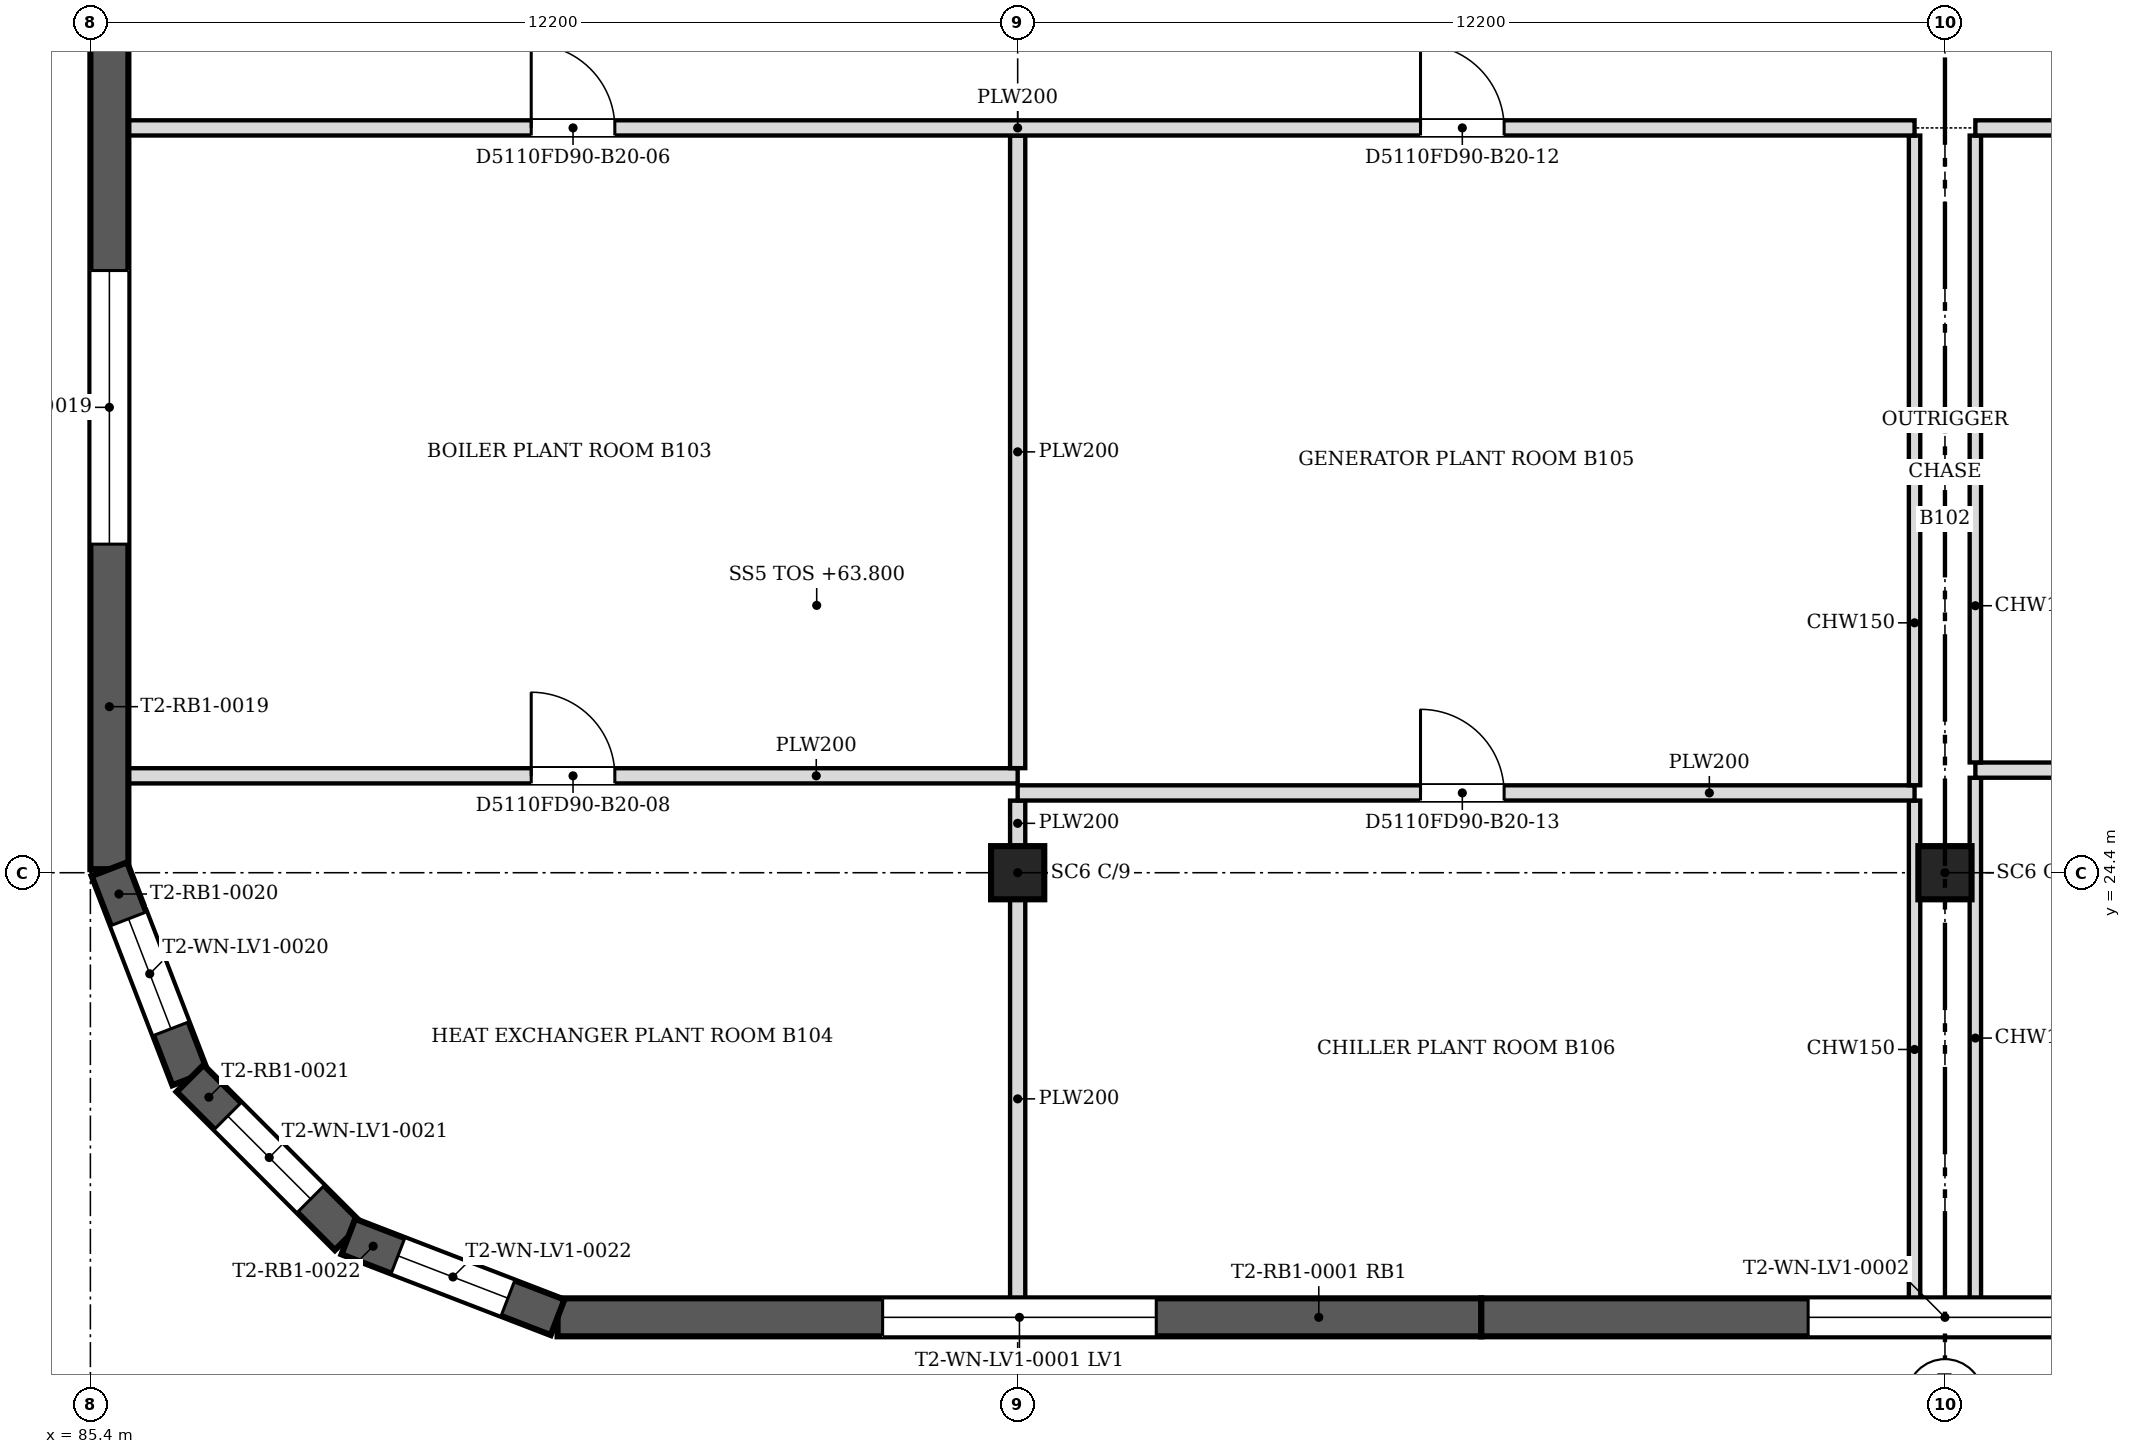
"""IFC4 building model, lengths in metres.
Left out: names, types, materials, properties, quantities, classifications, styles, units other than length and angle.
Written with IfcOpenShell. Run it as: python <this file> out.ifc"""

import sys

from ifc_helpers import new_model, si_unit, direction, frame, frame_2d, origin, origin_2d, place, context, subcontext, project, spatial, polyline, rectangle, outline, extrude, faceted_brep, source, transform, mapped, element, fill, save


model = new_model("IFC4")
c1 = context("Model", 3, precision=1e-05, world=origin(), true_north=direction((0.0, 1.0)))
c2 = subcontext(c1, "Body", "Model", "MODEL_VIEW")
j1 = project(units=[si_unit("LENGTHUNIT", "METRE"), si_unit("PLANEANGLEUNIT", "RADIAN")], contexts=[c1])
p1 = place(None, origin())
s1 = spatial("IfcSite", under=j1, at=p1, CompositionType="ELEMENT")
p2 = place(p1, origin())
s2 = spatial("IfcBuilding", under=s1, at=p2, CompositionType="ELEMENT")
p3 = place(p2, frame((0.0, 0.0, 63.8)))
s3 = spatial("IfcBuildingStorey", under=s2, at=p3, CompositionType="ELEMENT", Elevation=63.8)
for number, where, z_axis, x_axis in (
    (1, (97.6, 24.4, 0.0), (0.0, 0.0, 1.0), (1.0, 0.0, 0.0)),
    (2, (109.8, 24.4, 0.0), (0.0, 0.0, 1.0), (1.0, 0.0, 0.0)),
):
    element("IfcColumn", number, at=place(p3, frame(where, z_axis=z_axis, x_axis=x_axis)), inside=s3, PredefinedType="COLUMN", context=c2, shape_type="SweptSolid", body=[
        extrude(rectangle(XDim=0.7, YDim=0.7, at=origin_2d()), origin(), (0.0, 0.0, 1.0), 4.6),
    ])
m1 = source(origin(), c2, "Body", "Brep", [
    faceted_brep([(0.0, -0.25, 0.0), (12.154, -0.25, 0.0), (12.154, -0.25, 4.8), (0.0, -0.25, 4.8), (0.047, 0.25, 4.8), (12.154, 0.25, 4.8), (12.154, 0.25, 0.0), (0.047, 0.25, 0.0), (0.0, 0.0, 0.0), (0.0, 0.0, 4.8)], [[[0, 1, 2, 3]], [[4, 5, 6, 7]], [[7, 6, 1, 0, 8]], [[5, 4, 9, 3, 2]], [[8, 0, 3, 9]], [[7, 8, 9, 4]], [[1, 6, 5, 2]]]),
])
p4 = place(p3, frame((91.547, 18.55, 0.0), z_axis=(0.0, 0.0, 1.0), x_axis=(1.0, 0.0, 0.0)))
e3 = element("IfcWall", 3, at=p4, inside=s3, PredefinedType="SOLIDWALL", context=c2, shape_type="MappedRepresentation", body=[
    mapped(m1, transform((0.0, 0.0, 0.0), scale=1.0)),
])
m2 = source(origin(), c2, "Body", "SweptSolid", [
    extrude(outline(polyline([(4.277, 0.8), (7.877, 0.8), (7.877, 4.0), (4.277, 4.0), (4.277, 0.8)])), frame((0.0, 0.26, 0.0), z_axis=(0.0, -1.0, 0.0), x_axis=(1.0, 0.0, 0.0)), (0.0, 0.0, 1.0), 0.52),
])
p5 = place(p4, origin())
e4 = element("IfcOpeningElement", 4, at=p5, cuts=e3, PredefinedType="OPENING", context=c2, shape_type="MappedRepresentation", body=[
    mapped(m2, transform((0.0, 0.0, 0.0), scale=1.0)),
])
m3 = source(origin(), c2, "Body", "SweptSolid", [
    extrude(outline(polyline([(0.0, 0.0), (12.2, 0.0), (12.2, 4.8), (0.0, 4.8), (0.0, 0.0)])), frame((0.0, 0.25, 0.0), z_axis=(0.0, -1.0, 0.0), x_axis=(1.0, 0.0, 0.0)), (0.0, 0.0, 1.0), 0.5),
])
p6 = place(p3, frame((103.7, 18.55, 0.0), z_axis=(0.0, 0.0, 1.0), x_axis=(1.0, 0.0, 0.0)))
e5 = element("IfcWall", 5, at=p6, inside=s3, PredefinedType="SOLIDWALL", context=c2, shape_type="MappedRepresentation", body=[
    mapped(m3, transform((0.0, 0.0, 0.0), scale=1.0)),
])
m4 = source(origin(), c2, "Body", "SweptSolid", [
    extrude(outline(polyline([(4.3, 0.8), (7.9, 0.8), (7.9, 4.0), (4.3, 4.0), (4.3, 0.8)])), frame((0.0, 0.26, 0.0), z_axis=(0.0, -1.0, 0.0), x_axis=(1.0, 0.0, 0.0)), (0.0, 0.0, 1.0), 0.52),
])
p7 = place(p6, origin())
e6 = element("IfcOpeningElement", 6, at=p7, cuts=e5, PredefinedType="OPENING", context=c2, shape_type="MappedRepresentation", body=[
    mapped(m4, transform((0.0, 0.0, 0.0), scale=1.0)),
])
m5 = source(origin(), c2, "Body", "Brep", [
    faceted_brep([(0.0, -0.25, 0.0), (12.154, -0.25, 0.0), (12.154, -0.25, 4.8), (0.0, -0.25, 4.8), (0.0, 0.25, 4.8), (12.107, 0.25, 4.8), (12.107, 0.25, 0.0), (0.0, 0.25, 0.0), (12.154, -0.0, 0.0), (12.154, -0.0, 4.8)], [[[0, 1, 2, 3]], [[4, 5, 6, 7]], [[7, 6, 8, 1, 0]], [[9, 2, 1, 8]], [[5, 4, 3, 2, 9]], [[4, 7, 0, 3]], [[8, 6, 5, 9]]]),
])
p8 = place(p3, frame((85.65, 36.6, 0.0), z_axis=(0.0, 0.0, 1.0), x_axis=(0.0, -1.0, 0.0)))
e7 = element("IfcWall", 7, at=p8, inside=s3, PredefinedType="SOLIDWALL", context=c2, shape_type="MappedRepresentation", body=[
    mapped(m5, transform((0.0, 0.0, 0.0), scale=1.0)),
])
p9 = place(p8, origin())
e8 = element("IfcOpeningElement", 8, at=p9, cuts=e7, PredefinedType="OPENING", context=c2, shape_type="MappedRepresentation", body=[
    mapped(m2, transform((0.0, 0.0, 0.0), scale=1.0)),
])
m6 = source(origin(), c2, "Body", "Brep", [
    faceted_brep([(0.0, -0.25, 0.0), (2.95, -0.25, 0.0), (2.95, -0.25, 4.8), (0.0, -0.25, 4.8), (0.047, 0.25, 4.8), (2.898, 0.25, 4.8), (2.898, 0.25, 0.0), (0.047, 0.25, 0.0), (2.95, 0.0, 0.0), (0.0, 0.0, 0.0), (2.95, 0.0, 4.8), (0.0, 0.0, 4.8)], [[[0, 1, 2, 3]], [[4, 5, 6, 7]], [[7, 6, 8, 1, 0, 9]], [[10, 2, 1, 8]], [[5, 4, 11, 3, 2, 10]], [[9, 0, 3, 11]], [[7, 9, 11, 4]], [[8, 6, 5, 10]]]),
])
p10 = place(p3, frame((85.65, 24.447, 0.0), z_axis=(0.0, 0.0, 1.0), x_axis=(0.359949242603, -0.932971887438, 0.0)))
e9 = element("IfcWall", 9, at=p10, inside=s3, PredefinedType="SOLIDWALL", context=c2, shape_type="MappedRepresentation", body=[
    mapped(m6, transform((0.0, 0.0, 0.0), scale=1.0)),
])
m7 = source(origin(), c2, "Body", "SweptSolid", [
    extrude(outline(polyline([(0.7, 0.8), (2.25, 0.8), (2.25, 4.0), (0.7, 4.0), (0.7, 0.8)])), frame((0.0, 0.26, 0.0), z_axis=(0.0, -1.0, 0.0), x_axis=(1.0, 0.0, 0.0)), (0.0, 0.0, 1.0), 0.52),
])
p11 = place(p10, origin())
e10 = element("IfcOpeningElement", 10, at=p11, cuts=e9, PredefinedType="OPENING", context=c2, shape_type="MappedRepresentation", body=[
    mapped(m7, transform((0.0, 0.0, 0.0), scale=1.0)),
])
m8 = source(origin(), c2, "Body", "Brep", [
    faceted_brep([(0.0, -0.25, 0.0), (2.944, -0.25, 0.0), (2.944, -0.25, 4.8), (0.0, -0.25, 4.8), (0.053, 0.25, 4.8), (2.891, 0.25, 4.8), (2.891, 0.25, 0.0), (0.053, 0.25, 0.0), (2.944, 0.0, 0.0), (0.0, 0.0, 0.0), (2.944, 0.0, 4.8), (0.0, 0.0, 4.8)], [[[0, 1, 2, 3]], [[4, 5, 6, 7]], [[7, 6, 8, 1, 0, 9]], [[10, 2, 1, 8]], [[5, 4, 11, 3, 2, 10]], [[9, 0, 3, 11]], [[7, 9, 11, 4]], [[8, 6, 5, 10]]]),
])
p12 = place(p3, frame((86.712, 21.694, 0.0), z_axis=(0.0, 0.0, 1.0), x_axis=(0.707106781187, -0.707106781187, 0.0)))
e11 = element("IfcWall", 11, at=p12, inside=s3, PredefinedType="SOLIDWALL", context=c2, shape_type="MappedRepresentation", body=[
    mapped(m8, transform((0.0, 0.0, 0.0), scale=1.0)),
])
m9 = source(origin(), c2, "Body", "SweptSolid", [
    extrude(outline(polyline([(0.7, 0.8), (2.244, 0.8), (2.244, 4.0), (0.7, 4.0), (0.7, 0.8)])), frame((0.0, 0.26, 0.0), z_axis=(0.0, -1.0, 0.0), x_axis=(1.0, 0.0, 0.0)), (0.0, 0.0, 1.0), 0.52),
])
p13 = place(p12, origin())
e12 = element("IfcOpeningElement", 12, at=p13, cuts=e11, PredefinedType="OPENING", context=c2, shape_type="MappedRepresentation", body=[
    mapped(m9, transform((0.0, 0.0, 0.0), scale=1.0)),
])
m10 = source(origin(), c2, "Body", "Brep", [
    faceted_brep([(0.0, -0.25, 0.0), (2.95, -0.25, 0.0), (2.95, -0.25, 4.8), (0.0, -0.25, 4.8), (0.053, 0.25, 4.8), (2.904, 0.25, 4.8), (2.904, 0.25, 0.0), (0.053, 0.25, 0.0), (2.95, 0.0, 0.0), (0.0, 0.0, 0.0), (2.95, 0.0, 4.8), (0.0, 0.0, 4.8)], [[[0, 1, 2, 3]], [[4, 5, 6, 7]], [[7, 6, 8, 1, 0, 9]], [[10, 2, 1, 8]], [[5, 4, 11, 3, 2, 10]], [[9, 0, 3, 11]], [[7, 9, 11, 4]], [[8, 6, 5, 10]]]),
])
p14 = place(p3, frame((88.794, 19.612, 0.0), z_axis=(0.0, 0.0, 1.0), x_axis=(0.932999673775, -0.359877213415, 0.0)))
e13 = element("IfcWall", 13, at=p14, inside=s3, PredefinedType="SOLIDWALL", context=c2, shape_type="MappedRepresentation", body=[
    mapped(m10, transform((0.0, 0.0, 0.0), scale=1.0)),
])
p15 = place(p14, origin())
e14 = element("IfcOpeningElement", 14, at=p15, cuts=e13, PredefinedType="OPENING", context=c2, shape_type="MappedRepresentation", body=[
    mapped(m7, transform((0.0, 0.0, 0.0), scale=1.0)),
])
p16 = place(p3, frame((97.6, 18.8, 0.0), z_axis=(0.0, 0.0, 1.0), x_axis=(0.0, 1.0, 0.0)))
e15 = element("IfcWall", 15, at=p16, inside=s3, PredefinedType="PARTITIONING", context=c2, shape_type="SweptSolid", body=[
    extrude(rectangle(XDim=5.249, YDim=0.2, at=frame_2d((2.625, 0.0))), origin(), (0.0, 0.0, 1.0), 4.067),
])
p17 = place(p3, frame((109.4, 18.8, 0.0), z_axis=(0.0, 0.0, 1.0), x_axis=(0.0, 1.0, 0.0)))
e16 = element("IfcWall", 16, at=p17, inside=s3, PredefinedType="PARTITIONING", context=c2, shape_type="SweptSolid", body=[
    extrude(rectangle(XDim=6.549, YDim=0.15, at=frame_2d((3.274, 0.0))), origin(), (0.0, 0.0, 1.0), 4.067),
])
p18 = place(p3, frame((110.2, 18.8, 0.0), z_axis=(0.0, 0.0, 1.0), x_axis=(0.0, 1.0, 0.0)))
e17 = element("IfcWall", 17, at=p18, inside=s3, PredefinedType="PARTITIONING", context=c2, shape_type="SweptSolid", body=[
    extrude(rectangle(XDim=6.849, YDim=0.15, at=frame_2d((3.424, 0.0))), origin(), (0.0, 0.0, 1.0), 4.067),
])
p19 = place(p3, frame((97.6, 24.751, 0.0), z_axis=(0.0, 0.0, 1.0), x_axis=(0.0, 1.0, 0.0)))
e18 = element("IfcWall", 18, at=p19, inside=s3, PredefinedType="PARTITIONING", context=c2, shape_type="SweptSolid", body=[
    extrude(rectangle(XDim=0.598, YDim=0.2, at=frame_2d((0.299, 0.0))), origin(), (0.0, 0.0, 1.0), 4.067),
])
p20 = place(p3, frame((109.4, 25.45, 0.0), z_axis=(0.0, 0.0, 1.0), x_axis=(-1.0, 0.0, 0.0)))
e19 = element("IfcWall", 19, at=p20, inside=s3, PredefinedType="PARTITIONING", context=c2, shape_type="SweptSolid", body=[
    extrude(rectangle(XDim=11.8, YDim=0.2, at=frame_2d((5.9, 0.0))), origin(), (0.0, 0.0, 1.0), 4.067),
])
m11 = source(origin(), c2, "Body", "SweptSolid", [
    extrude(rectangle(XDim=1.1, YDim=2.1, at=frame_2d((0.55, 1.05))), frame((0.0, 0.11, 0.0), z_axis=(0.0, -1.0, 0.0), x_axis=(1.0, 0.0, 0.0)), (0.0, 0.0, 1.0), 0.22),
])
p21 = place(p20, frame((5.4, 0.0, 0.0)))
e20 = element("IfcOpeningElement", 20, at=p21, cuts=e19, PredefinedType="OPENING", context=c2, shape_type="MappedRepresentation", body=[
    mapped(m11, transform((0.0, 0.0, 0.0), scale=1.0)),
])
p22 = place(p3, frame((109.4, 25.551, 0.0), z_axis=(0.0, 0.0, 1.0), x_axis=(0.0, 1.0, 0.0)))
e21 = element("IfcWall", 21, at=p22, inside=s3, PredefinedType="PARTITIONING", context=c2, shape_type="SweptSolid", body=[
    extrude(rectangle(XDim=8.548, YDim=0.15, at=frame_2d((4.274, 0.0))), origin(), (0.0, 0.0, 1.0), 4.067),
])
p23 = place(p3, frame((97.6, 25.675, 0.0), z_axis=(0.0, 0.0, 1.0), x_axis=(-1.0, 0.0, 0.0)))
e22 = element("IfcWall", 22, at=p23, inside=s3, PredefinedType="PARTITIONING", context=c2, shape_type="SweptSolid", body=[
    extrude(rectangle(XDim=11.7, YDim=0.2, at=frame_2d((5.85, 0.0))), origin(), (0.0, 0.0, 1.0), 4.067),
])
p24 = place(p23, frame((5.3, 0.0, 0.0)))
e23 = element("IfcOpeningElement", 23, at=p24, cuts=e22, PredefinedType="OPENING", context=c2, shape_type="MappedRepresentation", body=[
    mapped(m11, transform((0.0, 0.0, 0.0), scale=1.0)),
])
p25 = place(p3, frame((122.0, 25.75, 0.0), z_axis=(0.0, 0.0, 1.0), x_axis=(-1.0, 0.0, 0.0)))
e24 = element("IfcWall", 24, at=p25, inside=s3, PredefinedType="PARTITIONING", context=c2, shape_type="SweptSolid", body=[
    extrude(rectangle(XDim=11.8, YDim=0.2, at=frame_2d((5.9, 0.0))), origin(), (0.0, 0.0, 1.0), 4.067),
])
p26 = place(p25, frame((5.4, 0.0, 0.0)))
e25 = element("IfcOpeningElement", 25, at=p26, cuts=e24, PredefinedType="OPENING", context=c2, shape_type="MappedRepresentation", body=[
    mapped(m11, transform((0.0, 0.0, 0.0), scale=1.0)),
])
p27 = place(p3, frame((97.6, 25.776, 0.0), z_axis=(0.0, 0.0, 1.0), x_axis=(0.0, 1.0, 0.0)))
e26 = element("IfcWall", 26, at=p27, inside=s3, PredefinedType="PARTITIONING", context=c2, shape_type="SweptSolid", body=[
    extrude(rectangle(XDim=8.323, YDim=0.2, at=frame_2d((4.162, 0.0))), origin(), (0.0, 0.0, 1.0), 4.067),
])
p28 = place(p3, frame((110.2, 25.851, 0.0), z_axis=(0.0, 0.0, 1.0), x_axis=(0.0, 1.0, 0.0)))
e27 = element("IfcWall", 27, at=p28, inside=s3, PredefinedType="PARTITIONING", context=c2, shape_type="SweptSolid", body=[
    extrude(rectangle(XDim=8.248, YDim=0.15, at=frame_2d((4.124, 0.0))), origin(), (0.0, 0.0, 1.0), 4.067),
])
p29 = place(p3, frame((109.4, 34.2, 0.0), z_axis=(0.0, 0.0, 1.0), x_axis=(-1.0, 0.0, 0.0)))
e28 = element("IfcWall", 28, at=p29, inside=s3, PredefinedType="PARTITIONING", context=c2, shape_type="SweptSolid", body=[
    extrude(rectangle(XDim=23.5, YDim=0.2, at=frame_2d((11.75, 0.0))), origin(), (0.0, 0.0, 1.0), 4.067),
])
p30 = place(p29, frame((17.1, 0.0, 0.0)))
e29 = element("IfcOpeningElement", 29, at=p30, cuts=e28, PredefinedType="OPENING", context=c2, shape_type="MappedRepresentation", body=[
    mapped(m11, transform((0.0, 0.0, 0.0), scale=1.0)),
])
p31 = place(p29, frame((5.4, 0.0, 0.0)))
e30 = element("IfcOpeningElement", 30, at=p31, cuts=e28, PredefinedType="OPENING", context=c2, shape_type="MappedRepresentation", body=[
    mapped(m11, transform((0.0, 0.0, 0.0), scale=1.0)),
])
p32 = place(p3, frame((133.7, 34.2, 0.0), z_axis=(0.0, 0.0, 1.0), x_axis=(-1.0, 0.0, 0.0)))
e31 = element("IfcWall", 31, at=p32, inside=s3, PredefinedType="PARTITIONING", context=c2, shape_type="SweptSolid", body=[
    extrude(rectangle(XDim=23.5, YDim=0.2, at=frame_2d((11.75, 0.0))), origin(), (0.0, 0.0, 1.0), 4.067),
])
p33 = place(p32, frame((5.299, 0.0, 0.0)))
e32 = element("IfcOpeningElement", 32, at=p33, cuts=e31, PredefinedType="OPENING", context=c2, shape_type="MappedRepresentation", body=[
    mapped(m11, transform((0.0, 0.0, 0.0), scale=1.0)),
])
p34 = place(p32, frame((17.1, 0.0, 0.0)))
e33 = element("IfcOpeningElement", 33, at=p34, cuts=e31, PredefinedType="OPENING", context=c2, shape_type="MappedRepresentation", body=[
    mapped(m11, transform((0.0, 0.0, 0.0), scale=1.0)),
])
m12 = source(origin(), c2, "Body", "SweptSolid", [
    extrude(outline(polyline([(4.277, 0.8), (7.877, 0.8), (7.877, 4.0), (4.277, 4.0), (4.277, 0.8)])), frame((0.0, 0.03, 0.0), z_axis=(0.0, -1.0, 0.0), x_axis=(1.0, 0.0, 0.0)), (0.0, 0.0, 1.0), 0.06),
])
p35 = place(p5, origin())
e34 = element("IfcWindow", 34, at=p35, inside=s3, PartitioningType="USERDEFINED", PredefinedType="WINDOW", context=c2, shape_type="MappedRepresentation", body=[
    mapped(m12, transform((0.0, 0.0, 0.0), scale=1.0)),
])
fill(e4, e34)
m13 = source(origin(), c2, "Body", "SweptSolid", [
    extrude(outline(polyline([(4.3, 0.8), (7.9, 0.8), (7.9, 4.0), (4.3, 4.0), (4.3, 0.8)])), frame((0.0, 0.03, 0.0), z_axis=(0.0, -1.0, 0.0), x_axis=(1.0, 0.0, 0.0)), (0.0, 0.0, 1.0), 0.06),
])
p36 = place(p7, origin())
e35 = element("IfcWindow", 35, at=p36, inside=s3, PartitioningType="USERDEFINED", PredefinedType="WINDOW", context=c2, shape_type="MappedRepresentation", body=[
    mapped(m13, transform((0.0, 0.0, 0.0), scale=1.0)),
])
fill(e6, e35)
p37 = place(p9, origin())
e36 = element("IfcWindow", 36, at=p37, inside=s3, PartitioningType="USERDEFINED", PredefinedType="WINDOW", context=c2, shape_type="MappedRepresentation", body=[
    mapped(m12, transform((0.0, 0.0, 0.0), scale=1.0)),
])
fill(e8, e36)
m14 = source(origin(), c2, "Body", "SweptSolid", [
    extrude(outline(polyline([(0.7, 0.8), (2.25, 0.8), (2.25, 4.0), (0.7, 4.0), (0.7, 0.8)])), frame((0.0, 0.03, 0.0), z_axis=(0.0, -1.0, 0.0), x_axis=(1.0, 0.0, 0.0)), (0.0, 0.0, 1.0), 0.06),
])
p38 = place(p11, origin())
e37 = element("IfcWindow", 37, at=p38, inside=s3, PartitioningType="USERDEFINED", PredefinedType="WINDOW", context=c2, shape_type="MappedRepresentation", body=[
    mapped(m14, transform((0.0, 0.0, 0.0), scale=1.0)),
])
fill(e10, e37)
m15 = source(origin(), c2, "Body", "SweptSolid", [
    extrude(outline(polyline([(0.7, 0.8), (2.244, 0.8), (2.244, 4.0), (0.7, 4.0), (0.7, 0.8)])), frame((0.0, 0.03, 0.0), z_axis=(0.0, -1.0, 0.0), x_axis=(1.0, 0.0, 0.0)), (0.0, 0.0, 1.0), 0.06),
])
p39 = place(p13, origin())
e38 = element("IfcWindow", 38, at=p39, inside=s3, PartitioningType="USERDEFINED", PredefinedType="WINDOW", context=c2, shape_type="MappedRepresentation", body=[
    mapped(m15, transform((0.0, 0.0, 0.0), scale=1.0)),
])
fill(e12, e38)
p40 = place(p15, origin())
e39 = element("IfcWindow", 39, at=p40, inside=s3, PartitioningType="USERDEFINED", PredefinedType="WINDOW", context=c2, shape_type="MappedRepresentation", body=[
    mapped(m14, transform((0.0, 0.0, 0.0), scale=1.0)),
])
fill(e14, e39)
m16 = source(origin(), c2, "Body", "SweptSolid", [
    extrude(rectangle(XDim=1.1, YDim=2.1, at=frame_2d((0.55, 1.05))), frame((0.0, 0.025, 0.0), z_axis=(0.0, -1.0, 0.0), x_axis=(1.0, 0.0, 0.0)), (0.0, 0.0, 1.0), 0.05),
])
p41 = place(p30, origin())
e40 = element("IfcDoor", 40, at=p41, inside=s3, OperationType="SINGLE_SWING_RIGHT", PredefinedType="DOOR", context=c2, shape_type="MappedRepresentation", body=[
    mapped(m16, transform((0.0, 0.0, 0.0), scale=1.0)),
])
fill(e29, e40)
p42 = place(p24, origin())
e41 = element("IfcDoor", 41, at=p42, inside=s3, OperationType="SINGLE_SWING_RIGHT", PredefinedType="DOOR", context=c2, shape_type="MappedRepresentation", body=[
    mapped(m16, transform((0.0, 0.0, 0.0), scale=1.0)),
])
fill(e23, e41)
p43 = place(p31, origin())
e42 = element("IfcDoor", 42, at=p43, inside=s3, OperationType="SINGLE_SWING_RIGHT", PredefinedType="DOOR", context=c2, shape_type="MappedRepresentation", body=[
    mapped(m16, transform((0.0, 0.0, 0.0), scale=1.0)),
])
fill(e30, e42)
p44 = place(p21, origin())
e43 = element("IfcDoor", 43, at=p44, inside=s3, OperationType="SINGLE_SWING_RIGHT", PredefinedType="DOOR", context=c2, shape_type="MappedRepresentation", body=[
    mapped(m16, transform((0.0, 0.0, 0.0), scale=1.0)),
])
fill(e20, e43)
save(model, sys.argv[1])
